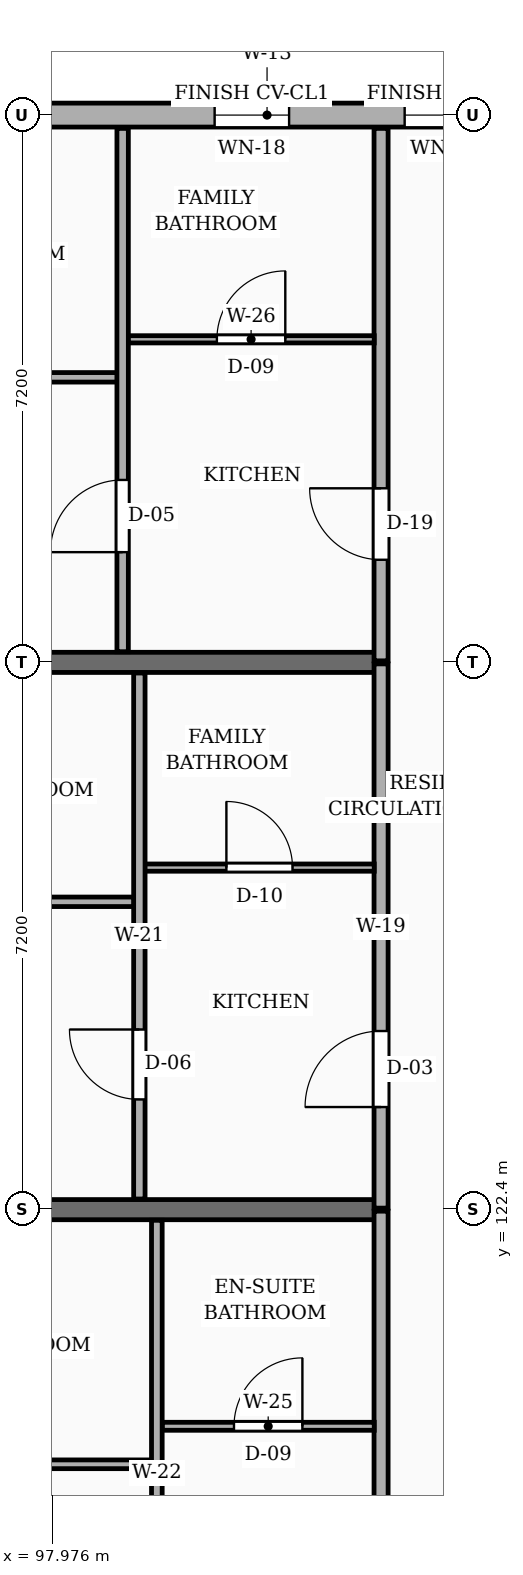
"""IFC4 building model, lengths in metres.
Left out: names, types, materials, properties, quantities, classifications, styles, units other than length and angle.
Written with IfcOpenShell. Run it as: python <this file> out.ifc"""

import sys

from ifc_helpers import new_model, si_unit, direction, frame, frame_2d, origin, place, context, subcontext, project, spatial, rectangle, extrude, element, fill, save


model = new_model("IFC4")
c1 = context("Model", 3, precision=1e-05, world=origin(), true_north=direction((0.0, 1.0)))
c2 = subcontext(c1, "Body", "Model", "MODEL_VIEW")
j1 = project(units=[si_unit("LENGTHUNIT", "METRE"), si_unit("PLANEANGLEUNIT", "RADIAN")], contexts=[c1])
p1 = place(None, origin())
s1 = spatial("IfcSite", under=j1, at=p1, CompositionType="ELEMENT")
p2 = place(p1, origin())
s2 = spatial("IfcBuilding", under=s1, at=p2, CompositionType="ELEMENT")
p3 = place(p2, origin())
s3 = spatial("IfcBuildingStorey", under=s2, at=p3, CompositionType="ELEMENT", Elevation=0.0)
p4 = place(p3, frame((90.3, 122.4, 0.0), z_axis=(0.0, 0.0, 1.0), x_axis=(1.0, 0.0, 0.0)))
e1 = element("IfcWall", 1, at=p4, inside=s3, PredefinedType="SOLIDWALL", context=c2, shape_type="SweptSolid", body=[
    extrude(rectangle(XDim=12.0, YDim=0.265, at=frame_2d((6.0, 0.0))), origin(), (0.0, 0.0, 1.0), 3.54),
])
p5 = place(p3, frame((90.26, 129.6, 0.0), z_axis=(0.0, 0.0, 1.0), x_axis=(1.0, 0.0, 0.0)))
e2 = element("IfcWall", 2, at=p5, inside=s3, PredefinedType="SOLIDWALL", context=c2, shape_type="SweptSolid", body=[
    extrude(rectangle(XDim=12.04, YDim=0.265, at=frame_2d((6.02, 0.0))), origin(), (0.0, 0.0, 1.0), 3.54),
])
p6 = place(p3, frame((104.1, 136.8, 0.0), z_axis=(0.0, 0.0, 1.0), x_axis=(-1.0, 0.0, 0.0)))
e3 = element("IfcWall", 3, at=p6, inside=s3, PredefinedType="SOLIDWALL", context=c2, shape_type="SweptSolid", body=[
    extrude(rectangle(XDim=6.6, YDim=0.315, at=frame_2d((3.3, 0.0))), origin(), (0.0, 0.0, 1.0), 3.81),
])
p7 = place(p6, frame((0.45, 0.0, 0.78)))
e4 = element("IfcOpeningElement", 4, at=p7, cuts=e3, PredefinedType="OPENING", context=c2, shape_type="SweptSolid", body=[
    extrude(rectangle(XDim=1.04, YDim=1.26, at=frame_2d((0.52, 0.63))), frame((0.0, 0.167, 0.0), z_axis=(0.0, -1.0, 0.0), x_axis=(1.0, 0.0, 0.0)), (0.0, 0.0, 1.0), 0.335),
])
p8 = place(p6, frame((3.01, 0.0, 0.78)))
e5 = element("IfcOpeningElement", 5, at=p8, cuts=e3, PredefinedType="OPENING", context=c2, shape_type="SweptSolid", body=[
    extrude(rectangle(XDim=0.98, YDim=1.36, at=frame_2d((0.49, 0.68))), frame((0.0, 0.167, 0.0), z_axis=(0.0, -1.0, 0.0), x_axis=(1.0, 0.0, 0.0)), (0.0, 0.0, 1.0), 0.335),
])
p9 = place(p3, frame((102.3, 115.22, 0.0), z_axis=(0.0, 0.0, 1.0), x_axis=(0.0, 1.0, 0.0)))
e6 = element("IfcWall", 6, at=p9, inside=s3, PredefinedType="PARTITIONING", context=c2, shape_type="SweptSolid", body=[
    extrude(rectangle(XDim=7.16, YDim=0.185, at=frame_2d((3.58, 0.0))), origin(), (0.0, 0.0, 1.0), 3.675),
])
p10 = place(p9, frame((1.33, 0.0, 0.0)))
e7 = element("IfcOpeningElement", 7, at=p10, cuts=e6, PredefinedType="OPENING", context=c2, shape_type="SweptSolid", body=[
    extrude(rectangle(XDim=1.14, YDim=2.18, at=frame_2d((0.57, 1.09))), frame((0.0, 0.103, 0.0), z_axis=(0.0, -1.0, 0.0), x_axis=(1.0, 0.0, 0.0)), (0.0, 0.0, 1.0), 0.205),
])
p11 = place(p3, frame((102.3, 122.42, 0.0), z_axis=(0.0, 0.0, 1.0), x_axis=(0.0, 1.0, 0.0)))
e8 = element("IfcWall", 8, at=p11, inside=s3, PredefinedType="PARTITIONING", context=c2, shape_type="SweptSolid", body=[
    extrude(rectangle(XDim=7.16, YDim=0.185, at=frame_2d((3.58, 0.0))), origin(), (0.0, 0.0, 1.0), 3.675),
])
p12 = place(p11, frame((1.33, 0.0, 0.0)))
e9 = element("IfcOpeningElement", 9, at=p12, cuts=e8, PredefinedType="OPENING", context=c2, shape_type="SweptSolid", body=[
    extrude(rectangle(XDim=1.0, YDim=2.15, at=frame_2d((0.5, 1.075))), frame((0.0, 0.103, 0.0), z_axis=(0.0, -1.0, 0.0), x_axis=(1.0, 0.0, 0.0)), (0.0, 0.0, 1.0), 0.205),
])
p13 = place(p3, frame((102.3, 129.62, 0.0), z_axis=(0.0, 0.0, 1.0), x_axis=(0.0, 1.0, 0.0)))
e10 = element("IfcWall", 10, at=p13, inside=s3, PredefinedType="PARTITIONING", context=c2, shape_type="SweptSolid", body=[
    extrude(rectangle(XDim=7.005, YDim=0.185, at=frame_2d((3.502, 0.0))), origin(), (0.0, 0.0, 1.0), 3.675),
])
p14 = place(p13, frame((1.33, 0.0, 0.0)))
e11 = element("IfcOpeningElement", 11, at=p14, cuts=e10, PredefinedType="OPENING", context=c2, shape_type="SweptSolid", body=[
    extrude(rectangle(XDim=0.94, YDim=2.12, at=frame_2d((0.47, 1.06))), frame((0.0, 0.103, 0.0), z_axis=(0.0, -1.0, 0.0), x_axis=(1.0, 0.0, 0.0)), (0.0, 0.0, 1.0), 0.205),
])
p15 = place(p3, frame((90.175, 119.05, 0.0), z_axis=(0.0, 0.0, 1.0), x_axis=(1.0, 0.0, 0.0)))
e12 = element("IfcWall", 12, at=p15, inside=s3, PredefinedType="PARTITIONING", context=c2, shape_type="SweptSolid", body=[
    extrude(rectangle(XDim=9.105, YDim=0.115, at=frame_2d((4.552, 0.0))), origin(), (0.0, 0.0, 1.0), 3.675),
])
p16 = place(p15, frame((4.103, 0.0, 0.0)))
e13 = element("IfcOpeningElement", 13, at=p16, cuts=e12, PredefinedType="OPENING", context=c2, shape_type="SweptSolid", body=[
    extrude(rectangle(XDim=0.9, YDim=2.1, at=frame_2d((0.45, 1.05))), frame((0.0, 0.067, 0.0), z_axis=(0.0, -1.0, 0.0), x_axis=(1.0, 0.0, 0.0)), (0.0, 0.0, 1.0), 0.135),
])
p17 = place(p3, frame((99.42, 119.55, 0.0), z_axis=(0.0, 0.0, 1.0), x_axis=(1.0, 0.0, 0.0)))
e14 = element("IfcWall", 14, at=p17, inside=s3, PredefinedType="PARTITIONING", context=c2, shape_type="SweptSolid", body=[
    extrude(rectangle(XDim=2.79, YDim=0.105, at=frame_2d((1.395, 0.0))), origin(), (0.0, 0.0, 1.0), 3.675),
])
p18 = place(p17, frame((0.945, 0.0, 0.0)))
e15 = element("IfcOpeningElement", 15, at=p18, cuts=e14, PredefinedType="OPENING", context=c2, shape_type="SweptSolid", body=[
    extrude(rectangle(XDim=0.9, YDim=2.05, at=frame_2d((0.45, 1.025))), frame((0.0, 0.062, 0.0), z_axis=(0.0, -1.0, 0.0), x_axis=(1.0, 0.0, 0.0)), (0.0, 0.0, 1.0), 0.125),
])
p19 = place(p3, frame((99.35, 115.34, 0.0), z_axis=(0.0, 0.0, 1.0), x_axis=(0.0, 1.0, 0.0)))
e16 = element("IfcWall", 16, at=p19, inside=s3, PredefinedType="PARTITIONING", context=c2, shape_type="SweptSolid", body=[
    extrude(rectangle(XDim=6.92, YDim=0.14, at=frame_2d((3.46, 0.0))), origin(), (0.0, 0.0, 1.0), 3.675),
])
p20 = place(p19, frame((1.31, 0.0, 0.0)))
e17 = element("IfcOpeningElement", 17, at=p20, cuts=e16, PredefinedType="OPENING", context=c2, shape_type="SweptSolid", body=[
    extrude(rectangle(XDim=0.95, YDim=2.1, at=frame_2d((0.475, 1.05))), frame((0.0, 0.08, 0.0), z_axis=(0.0, -1.0, 0.0), x_axis=(1.0, 0.0, 0.0)), (0.0, 0.0, 1.0), 0.16),
])
p21 = place(p3, frame((90.175, 126.45, 0.0), z_axis=(0.0, 0.0, 1.0), x_axis=(1.0, 0.0, 0.0)))
e18 = element("IfcWall", 18, at=p21, inside=s3, PredefinedType="PARTITIONING", context=c2, shape_type="SweptSolid", body=[
    extrude(rectangle(XDim=8.875, YDim=0.125, at=frame_2d((4.438, 0.0))), origin(), (0.0, 0.0, 1.0), 3.675),
])
p22 = place(p21, frame((3.998, 0.0, 0.0)))
e19 = element("IfcOpeningElement", 19, at=p22, cuts=e18, PredefinedType="OPENING", context=c2, shape_type="SweptSolid", body=[
    extrude(rectangle(XDim=0.88, YDim=2.08, at=frame_2d((0.44, 1.04))), frame((0.0, 0.073, 0.0), z_axis=(0.0, -1.0, 0.0), x_axis=(1.0, 0.0, 0.0)), (0.0, 0.0, 1.0), 0.145),
])
p23 = place(p3, frame((99.19, 126.9, 0.0), z_axis=(0.0, 0.0, 1.0), x_axis=(1.0, 0.0, 0.0)))
e20 = element("IfcWall", 20, at=p23, inside=s3, PredefinedType="PARTITIONING", context=c2, shape_type="SweptSolid", body=[
    extrude(rectangle(XDim=3.02, YDim=0.095, at=frame_2d((1.51, 0.0))), origin(), (0.0, 0.0, 1.0), 3.675),
])
p24 = place(p23, frame((1.075, 0.0, 0.0)))
e21 = element("IfcOpeningElement", 21, at=p24, cuts=e20, PredefinedType="OPENING", context=c2, shape_type="SweptSolid", body=[
    extrude(rectangle(XDim=0.87, YDim=2.05, at=frame_2d((0.435, 1.025))), frame((0.0, 0.058, 0.0), z_axis=(0.0, -1.0, 0.0), x_axis=(1.0, 0.0, 0.0)), (0.0, 0.0, 1.0), 0.115),
])
p25 = place(p3, frame((99.12, 122.54, 0.0), z_axis=(0.0, 0.0, 1.0), x_axis=(0.0, 1.0, 0.0)))
e22 = element("IfcWall", 22, at=p25, inside=s3, PredefinedType="PARTITIONING", context=c2, shape_type="SweptSolid", body=[
    extrude(rectangle(XDim=6.92, YDim=0.15, at=frame_2d((3.46, 0.0))), origin(), (0.0, 0.0, 1.0), 3.675),
])
p26 = place(p25, frame((1.31, 0.0, 0.0)))
e23 = element("IfcOpeningElement", 23, at=p26, cuts=e22, PredefinedType="OPENING", context=c2, shape_type="SweptSolid", body=[
    extrude(rectangle(XDim=0.92, YDim=2.1, at=frame_2d((0.46, 1.05))), frame((0.0, 0.085, 0.0), z_axis=(0.0, -1.0, 0.0), x_axis=(1.0, 0.0, 0.0)), (0.0, 0.0, 1.0), 0.17),
])
p27 = place(p3, frame((90.175, 133.35, 0.0), z_axis=(0.0, 0.0, 1.0), x_axis=(1.0, 0.0, 0.0)))
e24 = element("IfcWall", 24, at=p27, inside=s3, PredefinedType="PARTITIONING", context=c2, shape_type="SweptSolid", body=[
    extrude(rectangle(XDim=8.655, YDim=0.125, at=frame_2d((4.328, 0.0))), origin(), (0.0, 0.0, 1.0), 3.675),
])
p28 = place(p27, frame((3.877, 0.0, 0.0)))
e25 = element("IfcOpeningElement", 25, at=p28, cuts=e24, PredefinedType="OPENING", context=c2, shape_type="SweptSolid", body=[
    extrude(rectangle(XDim=0.9, YDim=2.1, at=frame_2d((0.45, 1.05))), frame((0.0, 0.073, 0.0), z_axis=(0.0, -1.0, 0.0), x_axis=(1.0, 0.0, 0.0)), (0.0, 0.0, 1.0), 0.145),
])
p29 = place(p3, frame((98.97, 133.85, 0.0), z_axis=(0.0, 0.0, 1.0), x_axis=(1.0, 0.0, 0.0)))
e26 = element("IfcWall", 26, at=p29, inside=s3, PredefinedType="PARTITIONING", context=c2, shape_type="SweptSolid", body=[
    extrude(rectangle(XDim=3.24, YDim=0.095, at=frame_2d((1.62, 0.0))), origin(), (0.0, 0.0, 1.0), 3.675),
])
p30 = place(p29, frame((1.17, 0.0, 0.0)))
e27 = element("IfcOpeningElement", 27, at=p30, cuts=e26, PredefinedType="OPENING", context=c2, shape_type="SweptSolid", body=[
    extrude(rectangle(XDim=0.9, YDim=2.05, at=frame_2d((0.45, 1.025))), frame((0.0, 0.058, 0.0), z_axis=(0.0, -1.0, 0.0), x_axis=(1.0, 0.0, 0.0)), (0.0, 0.0, 1.0), 0.115),
])
p31 = place(p3, frame((98.9, 129.74, 0.0), z_axis=(0.0, 0.0, 1.0), x_axis=(0.0, 1.0, 0.0)))
e28 = element("IfcWall", 28, at=p31, inside=s3, PredefinedType="PARTITIONING", context=c2, shape_type="SweptSolid", body=[
    extrude(rectangle(XDim=6.885, YDim=0.15, at=frame_2d((3.442, 0.0))), origin(), (0.0, 0.0, 1.0), 3.675),
])
p32 = place(p31, frame((1.31, 0.0, 0.0)))
e29 = element("IfcOpeningElement", 29, at=p32, cuts=e28, PredefinedType="OPENING", context=c2, shape_type="SweptSolid", body=[
    extrude(rectangle(XDim=0.95, YDim=2.1, at=frame_2d((0.475, 1.05))), frame((0.0, 0.085, 0.0), z_axis=(0.0, -1.0, 0.0), x_axis=(1.0, 0.0, 0.0)), (0.0, 0.0, 1.0), 0.17),
])
p33 = place(p7, origin())
e30 = element("IfcWindow", 30, at=p33, inside=s3, PartitioningType="SINGLE_PANEL", PredefinedType="WINDOW", context=c2, shape_type="SweptSolid", body=[
    extrude(rectangle(XDim=1.04, YDim=1.26, at=frame_2d((0.52, 0.63))), frame((0.0, 0.03, 0.0), z_axis=(0.0, -1.0, 0.0), x_axis=(1.0, 0.0, 0.0)), (0.0, 0.0, 1.0), 0.06),
])
fill(e4, e30)
p34 = place(p8, origin())
e31 = element("IfcWindow", 31, at=p34, inside=s3, PartitioningType="SINGLE_PANEL", PredefinedType="WINDOW", context=c2, shape_type="SweptSolid", body=[
    extrude(rectangle(XDim=0.98, YDim=1.36, at=frame_2d((0.49, 0.68))), frame((0.0, 0.03, 0.0), z_axis=(0.0, -1.0, 0.0), x_axis=(1.0, 0.0, 0.0)), (0.0, 0.0, 1.0), 0.06),
])
fill(e5, e31)
p35 = place(p12, origin())
e32 = element("IfcDoor", 32, at=p35, inside=s3, OperationType="SINGLE_SWING_LEFT", PredefinedType="DOOR", context=c2, shape_type="SweptSolid", body=[
    extrude(rectangle(XDim=1.0, YDim=2.15, at=frame_2d((0.5, 1.075))), frame((0.0, 0.025, 0.0), z_axis=(0.0, -1.0, 0.0), x_axis=(1.0, 0.0, 0.0)), (0.0, 0.0, 1.0), 0.05),
])
fill(e9, e32)
p36 = place(p14, origin())
e33 = element("IfcDoor", 33, at=p36, inside=s3, OperationType="SINGLE_SWING_RIGHT", PredefinedType="DOOR", context=c2, shape_type="SweptSolid", body=[
    extrude(rectangle(XDim=0.94, YDim=2.12, at=frame_2d((0.47, 1.06))), frame((0.0, 0.025, 0.0), z_axis=(0.0, -1.0, 0.0), x_axis=(1.0, 0.0, 0.0)), (0.0, 0.0, 1.0), 0.05),
])
fill(e11, e33)
p37 = place(p18, origin())
e34 = element("IfcDoor", 34, at=p37, inside=s3, OperationType="SINGLE_SWING_RIGHT", PredefinedType="DOOR", context=c2, shape_type="SweptSolid", body=[
    extrude(rectangle(XDim=0.9, YDim=2.05, at=frame_2d((0.45, 1.025))), frame((0.0, 0.025, 0.0), z_axis=(0.0, -1.0, 0.0), x_axis=(1.0, 0.0, 0.0)), (0.0, 0.0, 1.0), 0.05),
])
fill(e15, e34)
p38 = place(p24, origin())
e35 = element("IfcDoor", 35, at=p38, inside=s3, OperationType="SINGLE_SWING_LEFT", PredefinedType="DOOR", context=c2, shape_type="SweptSolid", body=[
    extrude(rectangle(XDim=0.87, YDim=2.05, at=frame_2d((0.435, 1.025))), frame((0.0, 0.025, 0.0), z_axis=(0.0, -1.0, 0.0), x_axis=(1.0, 0.0, 0.0)), (0.0, 0.0, 1.0), 0.05),
])
fill(e21, e35)
p39 = place(p26, origin())
e36 = element("IfcDoor", 36, at=p39, inside=s3, OperationType="SINGLE_SWING_RIGHT", PredefinedType="DOOR", context=c2, shape_type="SweptSolid", body=[
    extrude(rectangle(XDim=0.92, YDim=2.1, at=frame_2d((0.46, 1.05))), frame((0.0, 0.025, 0.0), z_axis=(0.0, -1.0, 0.0), x_axis=(1.0, 0.0, 0.0)), (0.0, 0.0, 1.0), 0.05),
])
fill(e23, e36)
p40 = place(p30, origin())
e37 = element("IfcDoor", 37, at=p40, inside=s3, OperationType="SINGLE_SWING_RIGHT", PredefinedType="DOOR", context=c2, shape_type="SweptSolid", body=[
    extrude(rectangle(XDim=0.9, YDim=2.05, at=frame_2d((0.45, 1.025))), frame((0.0, 0.025, 0.0), z_axis=(0.0, -1.0, 0.0), x_axis=(1.0, 0.0, 0.0)), (0.0, 0.0, 1.0), 0.05),
])
fill(e27, e37)
p41 = place(p32, origin())
e38 = element("IfcDoor", 38, at=p41, inside=s3, OperationType="SINGLE_SWING_LEFT", PredefinedType="DOOR", context=c2, shape_type="SweptSolid", body=[
    extrude(rectangle(XDim=0.95, YDim=2.1, at=frame_2d((0.475, 1.05))), frame((0.0, 0.025, 0.0), z_axis=(0.0, -1.0, 0.0), x_axis=(1.0, 0.0, 0.0)), (0.0, 0.0, 1.0), 0.05),
])
fill(e29, e38)
save(model, sys.argv[1])
